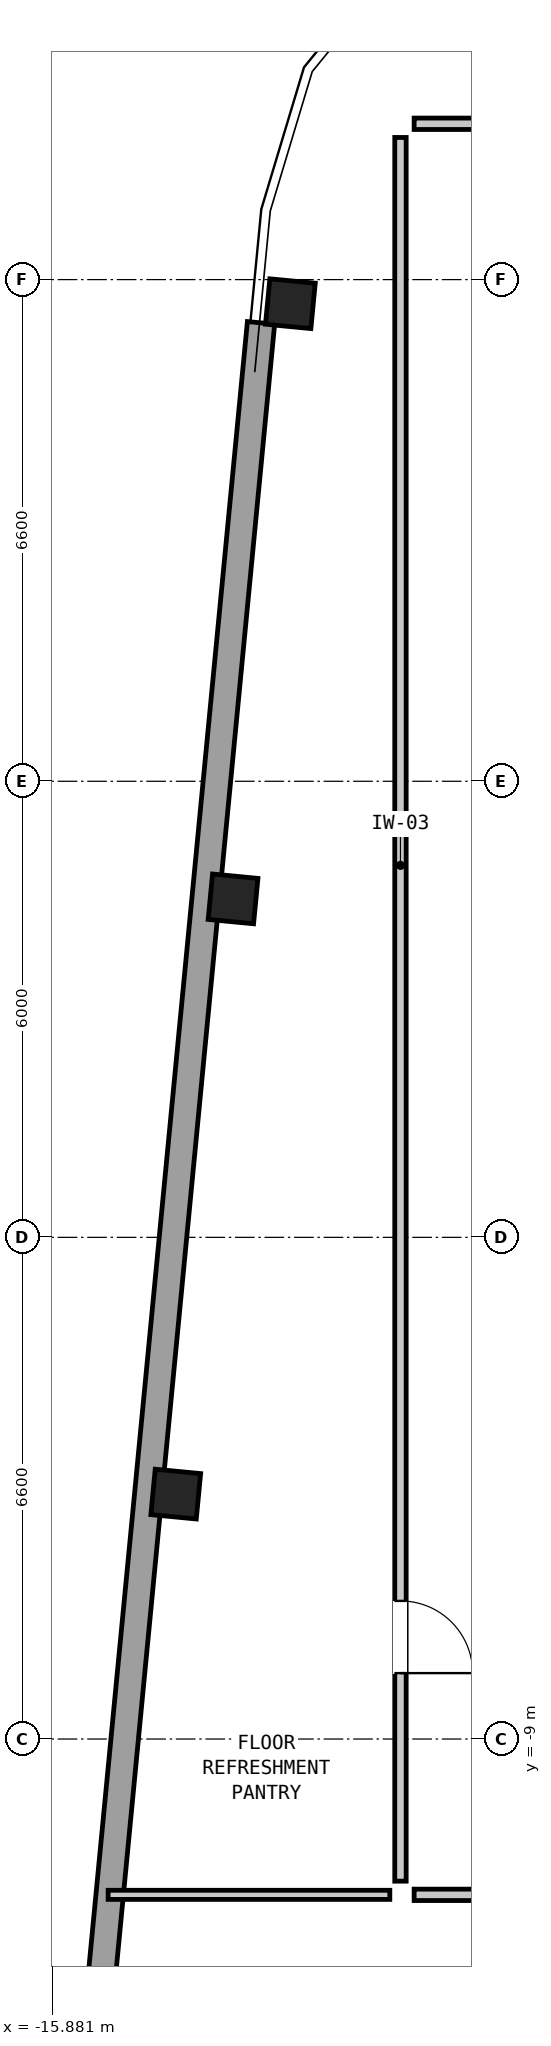
"""IFC4 building model, lengths in metres.
Left out: names, types, materials, properties, quantities, classifications, styles, units other than length and angle.
Written with IfcOpenShell. Run it as: python <this file> out.ifc"""

import sys

from ifc_helpers import new_model, si_unit, direction, frame, frame_2d, origin, origin_2d, place, context, subcontext, project, spatial, rectangle, hollow_rectangle, extrude, element, fill, save


model = new_model("IFC4")
c1 = context("Model", 3, precision=1e-05, world=origin(), true_north=direction((0.0, 1.0)))
c2 = subcontext(c1, "Body", "Model", "MODEL_VIEW")
j1 = project(units=[si_unit("LENGTHUNIT", "METRE"), si_unit("PLANEANGLEUNIT", "RADIAN")], contexts=[c1])
p1 = place(None, origin())
s1 = spatial("IfcSite", under=j1, at=p1, CompositionType="ELEMENT")
p2 = place(p1, origin())
s2 = spatial("IfcBuilding", under=s1, at=p2, CompositionType="ELEMENT")
p3 = place(p2, frame((0.0, 0.0, 242.85)))
s3 = spatial("IfcBuildingStorey", under=s2, at=p3, CompositionType="ELEMENT", Elevation=242.85)
for number, where, z_axis, x_axis in (
    (1, (-12.749, 9.883, 0.0), (0.0, 0.0, 1.0), (0.096, 0.995, 0.0)),
    (2, (-13.502, 2.052, 0.0), (0.0, 0.0, 1.0), (0.096, 0.995, 0.0)),
    (3, (-14.256, -5.778, 0.0), (0.0, 0.0, 1.0), (0.096, 0.995, 0.0)),
):
    element("IfcColumn", number, at=place(p3, frame(where, z_axis=z_axis, x_axis=x_axis)), inside=s3, PredefinedType="COLUMN", context=c2, shape_type="SweptSolid", body=[
        extrude(hollow_rectangle(XDim=0.6, YDim=0.6, WallThickness=0.04, at=origin_2d()), origin(), (0.0, 0.0, 1.0), 3.05),
    ])
p4 = place(p3, frame((-15.341, -13.287, 0.0), z_axis=(0.0, 0.0, 1.0), x_axis=(0.095847375411, 0.995396042099, 0.0)))
e4 = element("IfcWall", 4, at=p4, inside=s3, PredefinedType="SOLIDWALL", context=c2, shape_type="SweptSolid", body=[
    extrude(rectangle(XDim=23.024, YDim=0.36, at=frame_2d((11.512, 0.0))), origin(), (0.0, 0.0, 1.0), 0.48),
])
p5 = place(p3, frame((-15.146, -11.05, 0.0), z_axis=(0.0, 0.0, 1.0), x_axis=(1.0, 0.0, 0.0)))
e5 = element("IfcWall", 5, at=p5, inside=s3, PredefinedType="PARTITIONING", context=c2, shape_type="SweptSolid", body=[
    extrude(rectangle(XDim=3.706, YDim=0.12, at=frame_2d((1.853, 0.0))), origin(), (0.0, 0.0, 1.0), 2.86),
])
p6 = place(p3, frame((-11.12, 12.25, 0.0), z_axis=(0.0, 0.0, 1.0), x_axis=(1.0, 0.0, 0.0)))
e6 = element("IfcWall", 6, at=p6, inside=s3, PredefinedType="PARTITIONING", context=c2, shape_type="SweptSolid", body=[
    extrude(rectangle(XDim=10.44, YDim=0.15, at=frame_2d((5.22, 0.0))), origin(), (0.0, 0.0, 1.0), 2.86),
])
p7 = place(p6, frame((4.222, 0.0, 0.0)))
e7 = element("IfcOpeningElement", 7, at=p7, cuts=e6, PredefinedType="OPENING", context=c2, shape_type="SweptSolid", body=[
    extrude(rectangle(XDim=0.95, YDim=2.1, at=frame_2d((0.475, 1.05))), frame((0.0, 0.087, 0.0), z_axis=(0.0, -1.0, 0.0), x_axis=(1.0, 0.0, 0.0)), (0.0, 0.0, 1.0), 0.174),
])
p8 = place(p3, frame((-11.12, -11.05, 0.0), z_axis=(0.0, 0.0, 1.0), x_axis=(1.0, 0.0, 0.0)))
e8 = element("IfcWall", 8, at=p8, inside=s3, PredefinedType="PARTITIONING", context=c2, shape_type="SweptSolid", body=[
    extrude(rectangle(XDim=22.59, YDim=0.15, at=frame_2d((11.295, 0.0))), origin(), (0.0, 0.0, 1.0), 2.86),
])
p9 = place(p8, frame((10.82, 0.0, 0.0)))
e9 = element("IfcOpeningElement", 9, at=p9, cuts=e8, PredefinedType="OPENING", context=c2, shape_type="SweptSolid", body=[
    extrude(rectangle(XDim=0.95, YDim=2.1, at=frame_2d((0.475, 1.05))), frame((0.0, 0.087, 0.0), z_axis=(0.0, -1.0, 0.0), x_axis=(1.0, 0.0, 0.0)), (0.0, 0.0, 1.0), 0.174),
])
p10 = place(p3, frame((-11.3, 12.07, 0.0), z_axis=(0.0, 0.0, 1.0), x_axis=(0.0, -1.0, 0.0)))
e10 = element("IfcWall", 10, at=p10, inside=s3, PredefinedType="PARTITIONING", context=c2, shape_type="SweptSolid", body=[
    extrude(rectangle(XDim=22.94, YDim=0.15, at=frame_2d((11.47, 0.0))), origin(), (0.0, 0.0, 1.0), 2.86),
])
p11 = place(p10, frame((19.253, 0.0, 0.0)))
e11 = element("IfcOpeningElement", 11, at=p11, cuts=e10, PredefinedType="OPENING", context=c2, shape_type="SweptSolid", body=[
    extrude(rectangle(XDim=0.95, YDim=2.1, at=frame_2d((0.475, 1.05))), frame((0.0, 0.087, 0.0), z_axis=(0.0, -1.0, 0.0), x_axis=(1.0, 0.0, 0.0)), (0.0, 0.0, 1.0), 0.174),
])
p12 = place(p11, origin())
e12 = element("IfcDoor", 12, at=p12, inside=s3, OperationType="SINGLE_SWING_RIGHT", PredefinedType="DOOR", context=c2, shape_type="SweptSolid", body=[
    extrude(rectangle(XDim=0.95, YDim=2.1, at=frame_2d((0.475, 1.05))), frame((0.0, 0.025, 0.0), z_axis=(0.0, -1.0, 0.0), x_axis=(1.0, 0.0, 0.0)), (0.0, 0.0, 1.0), 0.05),
])
fill(e11, e12)
save(model, sys.argv[1])
